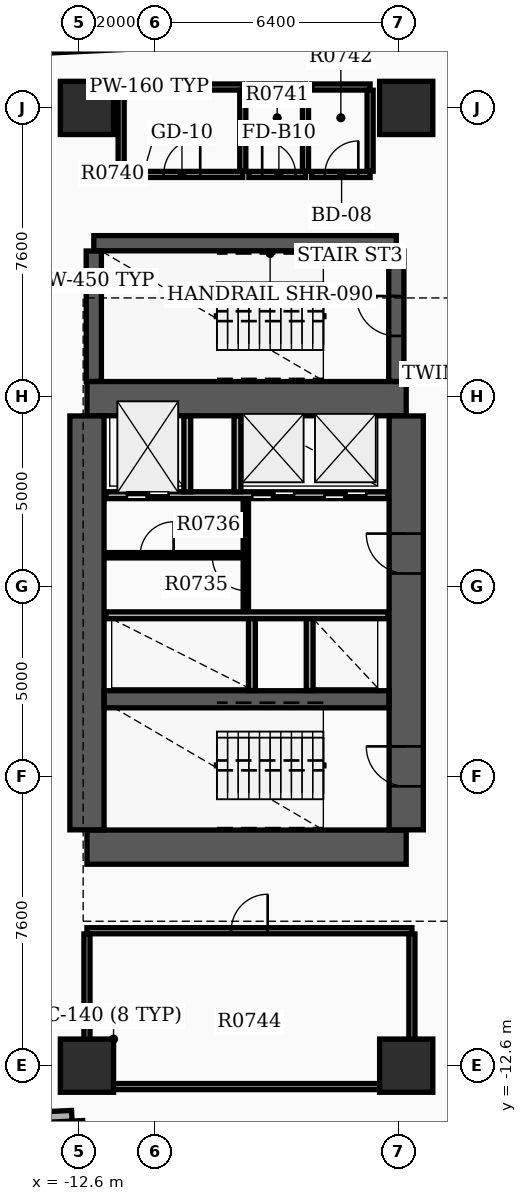
"""IFC4 building model, lengths in metres.
Left out: names, types, materials, properties, quantities, classifications, styles, units other than length and angle.
Written with IfcOpenShell. Run it as: python <this file> out.ifc"""

import sys

from ifc_helpers import new_model, si_unit, direction, frame, frame_2d, origin, origin_2d, place, context, subcontext, project, spatial, rectangle, extrude, element, fill, save


model = new_model("IFC4")
c1 = context("Model", 3, precision=1e-05, world=origin(), true_north=direction((0.0, 1.0)))
c2 = subcontext(c1, "Body", "Model", "MODEL_VIEW")
j1 = project(units=[si_unit("LENGTHUNIT", "METRE"), si_unit("PLANEANGLEUNIT", "RADIAN")], contexts=[c1])
p1 = place(None, origin())
s1 = spatial("IfcSite", under=j1, at=p1, CompositionType="ELEMENT")
p2 = place(p1, origin())
s2 = spatial("IfcBuilding", under=s1, at=p2, CompositionType="ELEMENT")
p3 = place(p2, frame((0.0, 0.0, 52.2)))
s3 = spatial("IfcBuildingStorey", under=s2, at=p3, CompositionType="ELEMENT", Elevation=52.2)
for number, where, z_axis, x_axis in (
    (1, (-12.4, -6.85, 0.0), (0.0, 0.0, 1.0), (1.0, 0.0, 0.0)),
    (2, (-12.4, 4.95, 0.0), (0.0, 0.0, 1.0), (1.0, 0.0, 0.0)),
):
    element("IfcWall", number, at=place(p3, frame(where, z_axis=z_axis, x_axis=x_axis)), inside=s3, PredefinedType="SHEAR", context=c2, shape_type="SweptSolid", body=[
        extrude(rectangle(XDim=8.4, YDim=0.9, at=frame_2d((4.2, 0.0))), origin(), (0.0, 0.0, 1.0), 3.7),
    ])
p4 = place(p3, frame((-12.4, -6.395, 0.0), z_axis=(0.0, 0.0, 1.0), x_axis=(0.0, 1.0, 0.0)))
e3 = element("IfcWall", 3, at=p4, inside=s3, PredefinedType="SHEAR", context=c2, shape_type="SweptSolid", body=[
    extrude(rectangle(XDim=10.89, YDim=0.9, at=frame_2d((5.445, 0.0))), origin(), (0.0, 0.0, 1.0), 3.7),
])
p5 = place(p3, frame((-4.0, -6.395, 0.0), z_axis=(0.0, 0.0, 1.0), x_axis=(0.0, 1.0, 0.0)))
e4 = element("IfcWall", 4, at=p5, inside=s3, PredefinedType="SHEAR", context=c2, shape_type="SweptSolid", body=[
    extrude(rectangle(XDim=10.89, YDim=0.9, at=frame_2d((5.445, 0.0))), origin(), (0.0, 0.0, 1.0), 3.7),
])
p6 = place(p5, frame((1.145, 0.0, 0.0)))
e5 = element("IfcOpeningElement", 5, at=p6, cuts=e4, PredefinedType="OPENING", context=c2, shape_type="SweptSolid", body=[
    extrude(rectangle(XDim=1.05, YDim=2.15, at=frame_2d((0.525, 1.075))), frame((0.0, 0.46, 0.0), z_axis=(0.0, -1.0, 0.0), x_axis=(1.0, 0.0, 0.0)), (0.0, 0.0, 1.0), 0.92),
])
p7 = place(p5, frame((6.745, 0.0, 0.0)))
e6 = element("IfcOpeningElement", 6, at=p7, cuts=e4, PredefinedType="OPENING", context=c2, shape_type="SweptSolid", body=[
    extrude(rectangle(XDim=1.05, YDim=2.15, at=frame_2d((0.525, 1.075))), frame((0.0, 0.46, 0.0), z_axis=(0.0, -1.0, 0.0), x_axis=(1.0, 0.0, 0.0)), (0.0, 0.0, 1.0), 0.92),
])
p8 = place(p3, frame((-11.945, -2.96, 0.0), z_axis=(0.0, 0.0, 1.0), x_axis=(1.0, 0.0, 0.0)))
e7 = element("IfcWall", 7, at=p8, inside=s3, PredefinedType="SHEAR", context=c2, shape_type="SweptSolid", body=[
    extrude(rectangle(XDim=7.49, YDim=0.45, at=frame_2d((3.745, 0.0))), origin(), (0.0, 0.0, 1.0), 3.7),
])
p9 = place(p3, frame((-12.22, 9.04, 0.0), z_axis=(0.0, 0.0, 1.0), x_axis=(1.0, 0.0, 0.0)))
e8 = element("IfcWall", 8, at=p9, inside=s3, PredefinedType="SHEAR", context=c2, shape_type="SweptSolid", body=[
    extrude(rectangle(XDim=7.96, YDim=0.4, at=frame_2d((3.98, 0.0))), origin(), (0.0, 0.0, 1.0), 3.7),
])
p10 = place(p3, frame((-12.22, 5.405, 0.0), z_axis=(0.0, 0.0, 1.0), x_axis=(0.0, 1.0, 0.0)))
e9 = element("IfcWall", 9, at=p10, inside=s3, PredefinedType="SHEAR", context=c2, shape_type="SweptSolid", body=[
    extrude(rectangle(XDim=3.43, YDim=0.4, at=frame_2d((1.715, 0.0))), origin(), (0.0, 0.0, 1.0), 3.7),
])
p11 = place(p3, frame((-4.26, 5.405, 0.0), z_axis=(0.0, 0.0, 1.0), x_axis=(0.0, 1.0, 0.0)))
e10 = element("IfcWall", 10, at=p11, inside=s3, PredefinedType="SHEAR", context=c2, shape_type="SweptSolid", body=[
    extrude(rectangle(XDim=3.43, YDim=0.4, at=frame_2d((1.715, 0.0))), origin(), (0.0, 0.0, 1.0), 3.7),
])
p12 = place(p11, frame((1.195, 0.0, 0.0)))
e11 = element("IfcOpeningElement", 11, at=p12, cuts=e10, PredefinedType="OPENING", context=c2, shape_type="SweptSolid", body=[
    extrude(rectangle(XDim=1.05, YDim=2.15, at=frame_2d((0.525, 1.075))), frame((0.0, 0.21, 0.0), z_axis=(0.0, -1.0, 0.0), x_axis=(1.0, 0.0, 0.0)), (0.0, 0.0, 1.0), 0.42),
])
for number, where, z_axis, x_axis in (
    (12, (-12.4, -12.6, 0.0), (0.0, 0.0, 1.0), (1.0, 0.0, 0.0)),
    (13, (-12.4, 12.6, 0.0), (0.0, 0.0, 1.0), (1.0, 0.0, 0.0)),
    (14, (-4.0, -12.6, 0.0), (0.0, 0.0, 1.0), (1.0, 0.0, 0.0)),
    (15, (-4.0, 12.6, 0.0), (0.0, 0.0, 1.0), (1.0, 0.0, 0.0)),
):
    element("IfcColumn", number, at=place(p3, frame(where, z_axis=z_axis, x_axis=x_axis)), inside=s3, PredefinedType="COLUMN", context=c2, shape_type="SweptSolid", body=[
        extrude(rectangle(XDim=1.4, YDim=1.4, at=origin_2d()), origin(), (0.0, 0.0, 1.0), 3.9),
    ])
p13 = place(p3, frame((-13.843, 14.164, 0.0), z_axis=(0.0, 0.0, 1.0), x_axis=(0.998889082162, 0.047123258997, 0.0)))
e16 = element("IfcWall", 16, at=p13, inside=s3, PredefinedType="STANDARD", context=c2, shape_type="SweptSolid", body=[
    extrude(rectangle(XDim=6.3, YDim=0.28, at=frame_2d((3.15, 0.0))), origin(), (0.0, 0.0, 1.0), 2.91),
])
p14 = place(p3, frame((-14.017, -13.976, 0.0), z_axis=(0.0, 0.0, 1.0), x_axis=(0.998883930236, 0.047232339719, 0.0)))
e17 = element("IfcWall", 17, at=p14, inside=s3, PredefinedType="STANDARD", context=c2, shape_type="SweptSolid", body=[
    extrude(rectangle(XDim=1.22, YDim=0.28, at=frame_2d((0.61, 0.0))), origin(), (0.0, 0.0, 1.0), 2.91),
])
p15 = place(p3, frame((-12.652, -14.052, 0.0), z_axis=(0.0, 0.0, 1.0), x_axis=(0.047039284441, -0.99889304018, 0.0)))
e18 = element("IfcWall", 18, at=p15, inside=s3, PredefinedType="STANDARD", context=c2, shape_type="SweptSolid", body=[
    extrude(rectangle(XDim=1.5, YDim=0.28, at=frame_2d((0.75, 0.0))), origin(), (0.0, 0.0, 1.0), 2.91),
])
p16 = place(p3, frame((-11.9, 2.41, 0.0), z_axis=(0.0, 0.0, 1.0), x_axis=(1.0, 0.0, 0.0)))
e19 = element("IfcWall", 19, at=p16, inside=s3, PredefinedType="SOLIDWALL", context=c2, shape_type="SweptSolid", body=[
    extrude(rectangle(XDim=7.42, YDim=0.18, at=frame_2d((3.71, 0.0))), origin(), (0.0, 0.0, 1.0), 2.9),
])
p17 = place(p16, frame((0.55, 0.0, 0.0)))
e20 = element("IfcOpeningElement", 20, at=p17, cuts=e19, PredefinedType="OPENING", context=c2, shape_type="SweptSolid", body=[
    extrude(rectangle(XDim=1.1, YDim=2.15, at=frame_2d((0.55, 1.075))), frame((0.0, 0.1, 0.0), z_axis=(0.0, -1.0, 0.0), x_axis=(1.0, 0.0, 0.0)), (0.0, 0.0, 1.0), 0.2),
])
p18 = place(p16, frame((3.85, 0.0, 0.0)))
e21 = element("IfcOpeningElement", 21, at=p18, cuts=e19, PredefinedType="OPENING", context=c2, shape_type="SweptSolid", body=[
    extrude(rectangle(XDim=1.1, YDim=2.15, at=frame_2d((0.55, 1.075))), frame((0.0, 0.1, 0.0), z_axis=(0.0, -1.0, 0.0), x_axis=(1.0, 0.0, 0.0)), (0.0, 0.0, 1.0), 0.2),
])
p19 = place(p16, frame((5.75, 0.0, 0.0)))
e22 = element("IfcOpeningElement", 22, at=p19, cuts=e19, PredefinedType="OPENING", context=c2, shape_type="SweptSolid", body=[
    extrude(rectangle(XDim=1.1, YDim=2.15, at=frame_2d((0.55, 1.075))), frame((0.0, 0.1, 0.0), z_axis=(0.0, -1.0, 0.0), x_axis=(1.0, 0.0, 0.0)), (0.0, 0.0, 1.0), 0.2),
])
p20 = place(p3, frame((-11.9, -0.75, 0.0), z_axis=(0.0, 0.0, 1.0), x_axis=(1.0, 0.0, 0.0)))
e23 = element("IfcWall", 23, at=p20, inside=s3, PredefinedType="SOLIDWALL", context=c2, shape_type="SweptSolid", body=[
    extrude(rectangle(XDim=7.42, YDim=0.18, at=frame_2d((3.71, 0.0))), origin(), (0.0, 0.0, 1.0), 2.9),
])
for number, where, z_axis, x_axis in (
    (24, (-9.76, 2.5, 0.0), (0.0, 0.0, 1.0), (0.0, 1.0, 0.0)),
    (25, (-8.44, 2.5, 0.0), (0.0, 0.0, 1.0), (0.0, 1.0, 0.0)),
):
    element("IfcWall", number, at=place(p3, frame(where, z_axis=z_axis, x_axis=x_axis)), inside=s3, PredefinedType="SOLIDWALL", context=c2, shape_type="SweptSolid", body=[
        extrude(rectangle(XDim=1.99, YDim=0.18, at=frame_2d((0.995, 0.0))), origin(), (0.0, 0.0, 1.0), 2.9),
    ])
for number, where, z_axis, x_axis in (
    (26, (-8.06, -2.73, 0.0), (0.0, 0.0, 1.0), (0.0, 1.0, 0.0)),
    (27, (-6.54, -2.73, 0.0), (0.0, 0.0, 1.0), (0.0, 1.0, 0.0)),
):
    element("IfcWall", number, at=place(p3, frame(where, z_axis=z_axis, x_axis=x_axis)), inside=s3, PredefinedType="SOLIDWALL", context=c2, shape_type="SweptSolid", body=[
        extrude(rectangle(XDim=1.89, YDim=0.18, at=frame_2d((0.945, 0.0))), origin(), (0.0, 0.0, 1.0), 2.9),
    ])
p21 = place(p3, frame((-8.22, -0.65, 0.0), z_axis=(0.0, 0.0, 1.0), x_axis=(0.0, 1.0, 0.0)))
e28 = element("IfcWall", 28, at=p21, inside=s3, PredefinedType="SOLIDWALL", context=c2, shape_type="SweptSolid", body=[
    extrude(rectangle(XDim=2.96, YDim=0.14, at=frame_2d((1.48, 0.0))), origin(), (0.0, 0.0, 1.0), 2.9),
])
p22 = place(p21, frame((0.55, 0.0, 0.0)))
e29 = element("IfcOpeningElement", 29, at=p22, cuts=e28, PredefinedType="OPENING", context=c2, shape_type="SweptSolid", body=[
    extrude(rectangle(XDim=0.88, YDim=2.1, at=frame_2d((0.44, 1.05))), frame((0.0, 0.08, 0.0), z_axis=(0.0, -1.0, 0.0), x_axis=(1.0, 0.0, 0.0)), (0.0, 0.0, 1.0), 0.16),
])
p23 = place(p3, frame((-11.85, 0.83, 0.0), z_axis=(0.0, 0.0, 1.0), x_axis=(1.0, 0.0, 0.0)))
e30 = element("IfcWall", 30, at=p23, inside=s3, PredefinedType="PARTITIONING", context=c2, shape_type="SweptSolid", body=[
    extrude(rectangle(XDim=3.552, YDim=0.14, at=frame_2d((1.776, 0.0))), origin(), (0.0, 0.0, 1.0), 2.9),
])
p24 = place(p23, frame((0.85, 0.0, 0.0)))
e31 = element("IfcOpeningElement", 31, at=p24, cuts=e30, PredefinedType="OPENING", context=c2, shape_type="SweptSolid", body=[
    extrude(rectangle(XDim=0.88, YDim=2.1, at=frame_2d((0.44, 1.05))), frame((0.0, 0.08, 0.0), z_axis=(0.0, -1.0, 0.0), x_axis=(1.0, 0.0, 0.0)), (0.0, 0.0, 1.0), 0.16),
])
p25 = place(p3, frame((-11.5, 10.85, 0.0), z_axis=(0.0, 0.0, 1.0), x_axis=(1.0, 0.0, 0.0)))
e32 = element("IfcWall", 32, at=p25, inside=s3, PredefinedType="PARTITIONING", context=c2, shape_type="SweptSolid", body=[
    extrude(rectangle(XDim=3.2, YDim=0.16, at=frame_2d((1.6, 0.0))), origin(), (0.0, 0.0, 1.0), 2.9),
])
p26 = place(p25, frame((1.12, 0.0, 0.0)))
e33 = element("IfcOpeningElement", 33, at=p26, cuts=e32, PredefinedType="OPENING", context=c2, shape_type="SweptSolid", body=[
    extrude(rectangle(XDim=0.96, YDim=2.15, at=frame_2d((0.48, 1.075))), frame((0.0, 0.09, 0.0), z_axis=(0.0, -1.0, 0.0), x_axis=(1.0, 0.0, 0.0)), (0.0, 0.0, 1.0), 0.18),
])
p27 = place(p3, frame((-11.5, 13.15, 0.0), z_axis=(0.0, 0.0, 1.0), x_axis=(1.0, 0.0, 0.0)))
e34 = element("IfcWall", 34, at=p27, inside=s3, PredefinedType="PARTITIONING", context=c2, shape_type="SweptSolid", body=[
    extrude(rectangle(XDim=3.2, YDim=0.16, at=frame_2d((1.6, 0.0))), origin(), (0.0, 0.0, 1.0), 2.9),
])
for number, where, z_axis, x_axis in (
    (35, (-11.5, 10.935, 0.0), (0.0, 0.0, 1.0), (0.0, 1.0, 0.0)),
    (36, (-8.3, 10.935, 0.0), (0.0, 0.0, 1.0), (0.0, 1.0, 0.0)),
):
    element("IfcWall", number, at=place(p3, frame(where, z_axis=z_axis, x_axis=x_axis)), inside=s3, PredefinedType="PARTITIONING", context=c2, shape_type="SweptSolid", body=[
        extrude(rectangle(XDim=2.13, YDim=0.16, at=frame_2d((1.065, 0.0))), origin(), (0.0, 0.0, 1.0), 2.9),
    ])
p28 = place(p3, frame((-8.14, 10.85, 0.0), z_axis=(0.0, 0.0, 1.0), x_axis=(1.0, 0.0, 0.0)))
e37 = element("IfcWall", 37, at=p28, inside=s3, PredefinedType="PARTITIONING", context=c2, shape_type="SweptSolid", body=[
    extrude(rectangle(XDim=1.49, YDim=0.16, at=frame_2d((0.745, 0.0))), origin(), (0.0, 0.0, 1.0), 2.9),
])
p29 = place(p28, frame((0.35, 0.0, 0.0)))
e38 = element("IfcOpeningElement", 38, at=p29, cuts=e37, PredefinedType="OPENING", context=c2, shape_type="SweptSolid", body=[
    extrude(rectangle(XDim=0.88, YDim=2.1, at=frame_2d((0.44, 1.05))), frame((0.0, 0.09, 0.0), z_axis=(0.0, -1.0, 0.0), x_axis=(1.0, 0.0, 0.0)), (0.0, 0.0, 1.0), 0.18),
])
p30 = place(p3, frame((-8.14, 13.15, 0.0), z_axis=(0.0, 0.0, 1.0), x_axis=(1.0, 0.0, 0.0)))
e39 = element("IfcWall", 39, at=p30, inside=s3, PredefinedType="PARTITIONING", context=c2, shape_type="SweptSolid", body=[
    extrude(rectangle(XDim=1.49, YDim=0.16, at=frame_2d((0.745, 0.0))), origin(), (0.0, 0.0, 1.0), 2.9),
])
p31 = place(p3, frame((-6.65, 10.935, 0.0), z_axis=(0.0, 0.0, 1.0), x_axis=(0.0, 1.0, 0.0)))
e40 = element("IfcWall", 40, at=p31, inside=s3, PredefinedType="PARTITIONING", context=c2, shape_type="SweptSolid", body=[
    extrude(rectangle(XDim=2.13, YDim=0.16, at=frame_2d((1.065, 0.0))), origin(), (0.0, 0.0, 1.0), 2.9),
])
p32 = place(p3, frame((-6.49, 10.85, 0.0), z_axis=(0.0, 0.0, 1.0), x_axis=(1.0, 0.0, 0.0)))
e41 = element("IfcWall", 41, at=p32, inside=s3, PredefinedType="PARTITIONING", context=c2, shape_type="SweptSolid", body=[
    extrude(rectangle(XDim=1.54, YDim=0.16, at=frame_2d((0.77, 0.0))), origin(), (0.0, 0.0, 1.0), 2.9),
])
p33 = place(p32, frame((0.35, 0.0, 0.0)))
e42 = element("IfcOpeningElement", 42, at=p33, cuts=e41, PredefinedType="OPENING", context=c2, shape_type="SweptSolid", body=[
    extrude(rectangle(XDim=0.88, YDim=2.15, at=frame_2d((0.44, 1.075))), frame((0.0, 0.09, 0.0), z_axis=(0.0, -1.0, 0.0), x_axis=(1.0, 0.0, 0.0)), (0.0, 0.0, 1.0), 0.18),
])
p34 = place(p3, frame((-6.49, 13.15, 0.0), z_axis=(0.0, 0.0, 1.0), x_axis=(1.0, 0.0, 0.0)))
e43 = element("IfcWall", 43, at=p34, inside=s3, PredefinedType="PARTITIONING", context=c2, shape_type="SweptSolid", body=[
    extrude(rectangle(XDim=1.54, YDim=0.16, at=frame_2d((0.77, 0.0))), origin(), (0.0, 0.0, 1.0), 2.9),
])
p35 = place(p3, frame((-4.95, 10.935, 0.0), z_axis=(0.0, 0.0, 1.0), x_axis=(0.0, 1.0, 0.0)))
e44 = element("IfcWall", 44, at=p35, inside=s3, PredefinedType="PARTITIONING", context=c2, shape_type="SweptSolid", body=[
    extrude(rectangle(XDim=2.13, YDim=0.16, at=frame_2d((1.065, 0.0))), origin(), (0.0, 0.0, 1.0), 2.9),
])
p36 = place(p3, frame((-12.4, -13.15, 0.0), z_axis=(0.0, 0.0, 1.0), x_axis=(1.0, 0.0, 0.0)))
e45 = element("IfcWall", 45, at=p36, inside=s3, PredefinedType="PARTITIONING", context=c2, shape_type="SweptSolid", body=[
    extrude(rectangle(XDim=8.55, YDim=0.16, at=frame_2d((4.275, 0.0))), origin(), (0.0, 0.0, 1.0), 2.9),
])
p37 = place(p3, frame((-12.4, -9.05, 0.0), z_axis=(0.0, 0.0, 1.0), x_axis=(1.0, 0.0, 0.0)))
e46 = element("IfcWall", 46, at=p37, inside=s3, PredefinedType="PARTITIONING", context=c2, shape_type="SweptSolid", body=[
    extrude(rectangle(XDim=8.55, YDim=0.16, at=frame_2d((4.275, 0.0))), origin(), (0.0, 0.0, 1.0), 2.9),
])
p38 = place(p37, frame((3.795, 0.0, 0.0)))
e47 = element("IfcOpeningElement", 47, at=p38, cuts=e46, PredefinedType="OPENING", context=c2, shape_type="SweptSolid", body=[
    extrude(rectangle(XDim=0.96, YDim=2.15, at=frame_2d((0.48, 1.075))), frame((0.0, 0.09, 0.0), z_axis=(0.0, -1.0, 0.0), x_axis=(1.0, 0.0, 0.0)), (0.0, 0.0, 1.0), 0.18),
])
for number, where, z_axis, x_axis in (
    (48, (-12.4, -13.065, 0.0), (0.0, 0.0, 1.0), (0.0, 1.0, 0.0)),
    (49, (-3.85, -13.065, 0.0), (0.0, 0.0, 1.0), (0.0, 1.0, 0.0)),
):
    element("IfcWall", number, at=place(p3, frame(where, z_axis=z_axis, x_axis=x_axis)), inside=s3, PredefinedType="PARTITIONING", context=c2, shape_type="SweptSolid", body=[
        extrude(rectangle(XDim=3.93, YDim=0.16, at=frame_2d((1.965, 0.0))), origin(), (0.0, 0.0, 1.0), 2.9),
    ])
p39 = place(p6, origin())
e50 = element("IfcDoor", 50, at=p39, inside=s3, OperationType="SINGLE_SWING_RIGHT", PredefinedType="DOOR", context=c2, shape_type="SweptSolid", body=[
    extrude(rectangle(XDim=1.05, YDim=2.15, at=frame_2d((0.525, 1.075))), frame((0.0, 0.025, 0.0), z_axis=(0.0, -1.0, 0.0), x_axis=(1.0, 0.0, 0.0)), (0.0, 0.0, 1.0), 0.05),
])
fill(e5, e50)
p40 = place(p7, origin())
e51 = element("IfcDoor", 51, at=p40, inside=s3, OperationType="SINGLE_SWING_RIGHT", PredefinedType="DOOR", context=c2, shape_type="SweptSolid", body=[
    extrude(rectangle(XDim=1.05, YDim=2.15, at=frame_2d((0.525, 1.075))), frame((0.0, 0.025, 0.0), z_axis=(0.0, -1.0, 0.0), x_axis=(1.0, 0.0, 0.0)), (0.0, 0.0, 1.0), 0.05),
])
fill(e6, e51)
p41 = place(p12, origin())
e52 = element("IfcDoor", 52, at=p41, inside=s3, OperationType="SINGLE_SWING_RIGHT", PredefinedType="DOOR", context=c2, shape_type="SweptSolid", body=[
    extrude(rectangle(XDim=1.05, YDim=2.15, at=frame_2d((0.525, 1.075))), frame((0.0, 0.025, 0.0), z_axis=(0.0, -1.0, 0.0), x_axis=(1.0, 0.0, 0.0)), (0.0, 0.0, 1.0), 0.05),
])
fill(e11, e52)
p42 = place(p17, origin())
e53 = element("IfcDoor", 53, at=p42, inside=s3, OperationType="DOUBLE_DOOR_SLIDING", PredefinedType="DOOR", context=c2, shape_type="SweptSolid", body=[
    extrude(rectangle(XDim=1.1, YDim=2.15, at=frame_2d((0.55, 1.075))), frame((0.0, 0.025, 0.0), z_axis=(0.0, -1.0, 0.0), x_axis=(1.0, 0.0, 0.0)), (0.0, 0.0, 1.0), 0.05),
])
fill(e20, e53)
p43 = place(p18, origin())
e54 = element("IfcDoor", 54, at=p43, inside=s3, OperationType="DOUBLE_DOOR_SLIDING", PredefinedType="DOOR", context=c2, shape_type="SweptSolid", body=[
    extrude(rectangle(XDim=1.1, YDim=2.15, at=frame_2d((0.55, 1.075))), frame((0.0, 0.025, 0.0), z_axis=(0.0, -1.0, 0.0), x_axis=(1.0, 0.0, 0.0)), (0.0, 0.0, 1.0), 0.05),
])
fill(e21, e54)
p44 = place(p19, origin())
e55 = element("IfcDoor", 55, at=p44, inside=s3, OperationType="DOUBLE_DOOR_SLIDING", PredefinedType="DOOR", context=c2, shape_type="SweptSolid", body=[
    extrude(rectangle(XDim=1.1, YDim=2.15, at=frame_2d((0.55, 1.075))), frame((0.0, 0.025, 0.0), z_axis=(0.0, -1.0, 0.0), x_axis=(1.0, 0.0, 0.0)), (0.0, 0.0, 1.0), 0.05),
])
fill(e22, e55)
p45 = place(p22, origin())
e56 = element("IfcDoor", 56, at=p45, inside=s3, OperationType="SINGLE_SWING_RIGHT", PredefinedType="DOOR", context=c2, shape_type="SweptSolid", body=[
    extrude(rectangle(XDim=0.88, YDim=2.1, at=frame_2d((0.44, 1.05))), frame((0.0, 0.025, 0.0), z_axis=(0.0, -1.0, 0.0), x_axis=(1.0, 0.0, 0.0)), (0.0, 0.0, 1.0), 0.05),
])
fill(e29, e56)
p46 = place(p24, origin())
e57 = element("IfcDoor", 57, at=p46, inside=s3, OperationType="SINGLE_SWING_RIGHT", PredefinedType="DOOR", context=c2, shape_type="SweptSolid", body=[
    extrude(rectangle(XDim=0.88, YDim=2.1, at=frame_2d((0.44, 1.05))), frame((0.0, 0.025, 0.0), z_axis=(0.0, -1.0, 0.0), x_axis=(1.0, 0.0, 0.0)), (0.0, 0.0, 1.0), 0.05),
])
fill(e31, e57)
p47 = place(p26, origin())
e58 = element("IfcDoor", 58, at=p47, inside=s3, OperationType="SINGLE_SWING_RIGHT", PredefinedType="DOOR", context=c2, shape_type="SweptSolid", body=[
    extrude(rectangle(XDim=0.96, YDim=2.15, at=frame_2d((0.48, 1.075))), frame((0.0, 0.025, 0.0), z_axis=(0.0, -1.0, 0.0), x_axis=(1.0, 0.0, 0.0)), (0.0, 0.0, 1.0), 0.05),
])
fill(e33, e58)
p48 = place(p29, origin())
e59 = element("IfcDoor", 59, at=p48, inside=s3, OperationType="SINGLE_SWING_LEFT", PredefinedType="DOOR", context=c2, shape_type="SweptSolid", body=[
    extrude(rectangle(XDim=0.88, YDim=2.1, at=frame_2d((0.44, 1.05))), frame((0.0, 0.025, 0.0), z_axis=(0.0, -1.0, 0.0), x_axis=(1.0, 0.0, 0.0)), (0.0, 0.0, 1.0), 0.05),
])
fill(e38, e59)
p49 = place(p33, origin())
e60 = element("IfcDoor", 60, at=p49, inside=s3, OperationType="SINGLE_SWING_RIGHT", PredefinedType="DOOR", context=c2, shape_type="SweptSolid", body=[
    extrude(rectangle(XDim=0.88, YDim=2.15, at=frame_2d((0.44, 1.075))), frame((0.0, 0.025, 0.0), z_axis=(0.0, -1.0, 0.0), x_axis=(1.0, 0.0, 0.0)), (0.0, 0.0, 1.0), 0.05),
])
fill(e42, e60)
p50 = place(p38, origin())
e61 = element("IfcDoor", 61, at=p50, inside=s3, OperationType="SINGLE_SWING_RIGHT", PredefinedType="DOOR", context=c2, shape_type="SweptSolid", body=[
    extrude(rectangle(XDim=0.96, YDim=2.15, at=frame_2d((0.48, 1.075))), frame((0.0, 0.025, 0.0), z_axis=(0.0, -1.0, 0.0), x_axis=(1.0, 0.0, 0.0)), (0.0, 0.0, 1.0), 0.05),
])
fill(e47, e61)
save(model, sys.argv[1])
